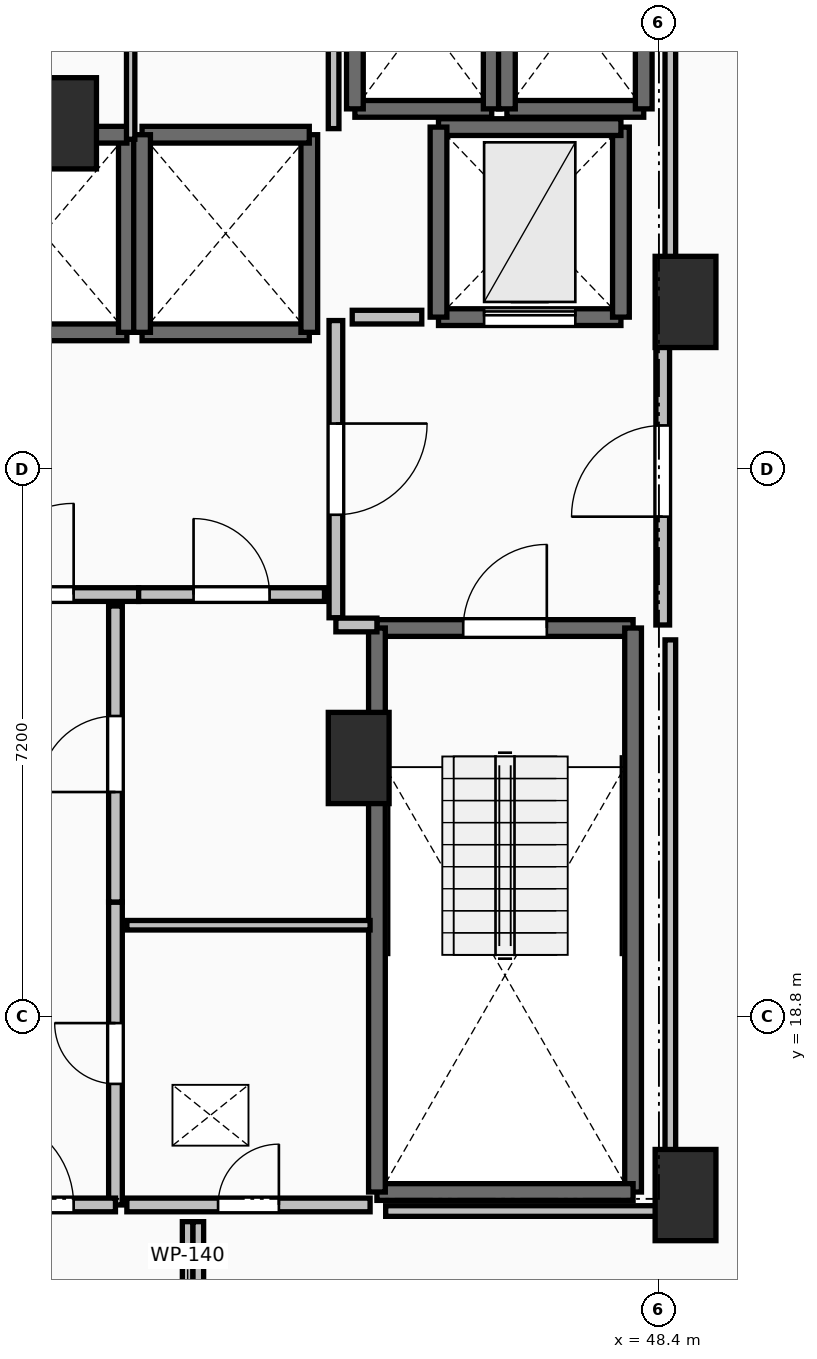
"""IFC4 building model, lengths in metres.
Left out: names, types, materials, properties, quantities, classifications, styles, units other than length and angle.
Written with IfcOpenShell. Run it as: python <this file> out.ifc"""

import sys

from ifc_helpers import new_model, si_unit, direction, frame, frame_2d, origin, origin_2d, place, context, subcontext, project, spatial, rectangle, extrude, element, fill, save


model = new_model("IFC4")
c1 = context("Model", 3, precision=1e-05, world=origin(), true_north=direction((0.0, 1.0)))
c2 = subcontext(c1, "Body", "Model", "MODEL_VIEW")
j1 = project(units=[si_unit("LENGTHUNIT", "METRE"), si_unit("PLANEANGLEUNIT", "RADIAN")], contexts=[c1])
p1 = place(None, origin())
s1 = spatial("IfcSite", under=j1, at=p1, CompositionType="ELEMENT")
p2 = place(p1, origin())
s2 = spatial("IfcBuilding", under=s1, at=p2, CompositionType="ELEMENT")
p3 = place(p2, frame((0.0, 0.0, 160.6)))
s3 = spatial("IfcBuildingStorey", under=s2, at=p3, CompositionType="ELEMENT", Elevation=160.6)
for number, where, z_axis, x_axis in (
    (1, (48.75, 28.2, 0.0), (0.0, 0.0, 1.0), (1.0, 0.0, 0.0)),
    (2, (48.75, 16.45, 0.0), (0.0, 0.0, 1.0), (1.0, 0.0, 0.0)),
    (3, (44.45, 22.2, 0.0), (0.0, 0.0, 1.0), (1.0, 0.0, 0.0)),
    (4, (40.6, 30.55, 0.0), (0.0, 0.0, 1.0), (1.0, 0.0, 0.0)),
):
    element("IfcColumn", number, at=place(p3, frame(where, z_axis=z_axis, x_axis=x_axis)), inside=s3, PredefinedType="PILASTER", context=c2, shape_type="SweptSolid", body=[
        extrude(rectangle(XDim=0.8, YDim=1.2, at=origin_2d()), origin(), (0.0, 0.0, 1.0), 3.5),
    ])
p4 = place(p3, frame((44.69, 23.91, 0.0), z_axis=(0.0, 0.0, 1.0), x_axis=(1.0, 0.0, 0.0)))
e5 = element("IfcWall", 5, at=p4, inside=s3, PredefinedType="SOLIDWALL", context=c2, shape_type="SweptSolid", body=[
    extrude(rectangle(XDim=3.37, YDim=0.22, at=frame_2d((1.685, 0.0))), origin(), (0.0, 0.0, 1.0), 3.24),
])
p5 = place(p4, frame((1.135, 0.0, 0.0)))
e6 = element("IfcOpeningElement", 6, at=p5, cuts=e5, PredefinedType="OPENING", context=c2, shape_type="SweptSolid", body=[
    extrude(rectangle(XDim=1.1, YDim=2.15, at=frame_2d((0.55, 1.075))), frame((0.0, 0.125, 0.0), z_axis=(0.0, -1.0, 0.0), x_axis=(1.0, 0.0, 0.0)), (0.0, 0.0, 1.0), 0.25),
])
p6 = place(p3, frame((48.06, 23.91, 0.0), z_axis=(0.0, 0.0, 1.0), x_axis=(0.0, -1.0, 0.0)))
e7 = element("IfcWall", 7, at=p6, inside=s3, PredefinedType="SOLIDWALL", context=c2, shape_type="SweptSolid", body=[
    extrude(rectangle(XDim=7.42, YDim=0.22, at=frame_2d((3.71, 0.0))), origin(), (0.0, 0.0, 1.0), 3.24),
])
p7 = place(p3, frame((48.06, 16.49, 0.0), z_axis=(0.0, 0.0, 1.0), x_axis=(-1.0, 0.0, 0.0)))
e8 = element("IfcWall", 8, at=p7, inside=s3, PredefinedType="SOLIDWALL", context=c2, shape_type="SweptSolid", body=[
    extrude(rectangle(XDim=3.37, YDim=0.22, at=frame_2d((1.685, 0.0))), origin(), (0.0, 0.0, 1.0), 3.24),
])
p8 = place(p3, frame((44.69, 16.49, 0.0), z_axis=(0.0, 0.0, 1.0), x_axis=(0.0, 1.0, 0.0)))
e9 = element("IfcWall", 9, at=p8, inside=s3, PredefinedType="SOLIDWALL", context=c2, shape_type="SweptSolid", body=[
    extrude(rectangle(XDim=7.42, YDim=0.22, at=frame_2d((3.71, 0.0))), origin(), (0.0, 0.0, 1.0), 3.24),
])
p9 = place(p3, frame((39.2, 27.8, 0.0), z_axis=(0.0, 0.0, 1.0), x_axis=(1.0, 0.0, 0.0)))
e10 = element("IfcWall", 10, at=p9, inside=s3, PredefinedType="SOLIDWALL", context=c2, shape_type="SweptSolid", body=[
    extrude(rectangle(XDim=2.2, YDim=0.22, at=frame_2d((1.1, 0.0))), origin(), (0.0, 0.0, 1.0), 3.24),
])
p10 = place(p3, frame((41.4, 27.8, 0.0), z_axis=(0.0, 0.0, 1.0), x_axis=(0.0, 1.0, 0.0)))
e11 = element("IfcWall", 11, at=p10, inside=s3, PredefinedType="SOLIDWALL", context=c2, shape_type="SweptSolid", body=[
    extrude(rectangle(XDim=2.6, YDim=0.22, at=frame_2d((1.3, 0.0))), origin(), (0.0, 0.0, 1.0), 3.24),
])
for number, where, z_axis, x_axis in (
    (12, (41.4, 30.4, 0.0), (0.0, 0.0, 1.0), (-1.0, 0.0, 0.0)),
    (13, (41.6, 27.8, 0.0), (0.0, 0.0, 1.0), (1.0, 0.0, 0.0)),
):
    element("IfcWall", number, at=place(p3, frame(where, z_axis=z_axis, x_axis=x_axis)), inside=s3, PredefinedType="SOLIDWALL", context=c2, shape_type="SweptSolid", body=[
        extrude(rectangle(XDim=2.2, YDim=0.22, at=frame_2d((1.1, 0.0))), origin(), (0.0, 0.0, 1.0), 3.24),
    ])
p11 = place(p3, frame((43.8, 27.8, 0.0), z_axis=(0.0, 0.0, 1.0), x_axis=(0.0, 1.0, 0.0)))
e14 = element("IfcWall", 14, at=p11, inside=s3, PredefinedType="SOLIDWALL", context=c2, shape_type="SweptSolid", body=[
    extrude(rectangle(XDim=2.6, YDim=0.22, at=frame_2d((1.3, 0.0))), origin(), (0.0, 0.0, 1.0), 3.24),
])
p12 = place(p3, frame((43.8, 30.4, 0.0), z_axis=(0.0, 0.0, 1.0), x_axis=(-1.0, 0.0, 0.0)))
e15 = element("IfcWall", 15, at=p12, inside=s3, PredefinedType="SOLIDWALL", context=c2, shape_type="SweptSolid", body=[
    extrude(rectangle(XDim=2.2, YDim=0.22, at=frame_2d((1.1, 0.0))), origin(), (0.0, 0.0, 1.0), 3.24),
])
p13 = place(p3, frame((41.6, 30.4, 0.0), z_axis=(0.0, 0.0, 1.0), x_axis=(0.0, -1.0, 0.0)))
e16 = element("IfcWall", 16, at=p13, inside=s3, PredefinedType="SOLIDWALL", context=c2, shape_type="SweptSolid", body=[
    extrude(rectangle(XDim=2.6, YDim=0.22, at=frame_2d((1.3, 0.0))), origin(), (0.0, 0.0, 1.0), 3.24),
])
p14 = place(p3, frame((44.4, 30.74, 0.0), z_axis=(0.0, 0.0, 1.0), x_axis=(1.0, 0.0, 0.0)))
e17 = element("IfcWall", 17, at=p14, inside=s3, PredefinedType="SOLIDWALL", context=c2, shape_type="SweptSolid", body=[
    extrude(rectangle(XDim=1.8, YDim=0.22, at=frame_2d((0.9, 0.0))), origin(), (0.0, 0.0, 1.0), 3.24),
])
for number, where, z_axis, x_axis in (
    (18, (46.2, 30.74, 0.0), (0.0, 0.0, 1.0), (0.0, 1.0, 0.0)),
    (19, (44.4, 33.16, 0.0), (0.0, 0.0, 1.0), (0.0, -1.0, 0.0)),
):
    element("IfcWall", number, at=place(p3, frame(where, z_axis=z_axis, x_axis=x_axis)), inside=s3, PredefinedType="SOLIDWALL", context=c2, shape_type="SweptSolid", body=[
        extrude(rectangle(XDim=2.42, YDim=0.22, at=frame_2d((1.21, 0.0))), origin(), (0.0, 0.0, 1.0), 3.24),
    ])
p15 = place(p3, frame((46.4, 30.74, 0.0), z_axis=(0.0, 0.0, 1.0), x_axis=(1.0, 0.0, 0.0)))
e20 = element("IfcWall", 20, at=p15, inside=s3, PredefinedType="SOLIDWALL", context=c2, shape_type="SweptSolid", body=[
    extrude(rectangle(XDim=1.8, YDim=0.22, at=frame_2d((0.9, 0.0))), origin(), (0.0, 0.0, 1.0), 3.24),
])
for number, where, z_axis, x_axis in (
    (21, (48.2, 30.74, 0.0), (0.0, 0.0, 1.0), (0.0, 1.0, 0.0)),
    (22, (46.4, 33.16, 0.0), (0.0, 0.0, 1.0), (0.0, -1.0, 0.0)),
):
    element("IfcWall", number, at=place(p3, frame(where, z_axis=z_axis, x_axis=x_axis)), inside=s3, PredefinedType="SOLIDWALL", context=c2, shape_type="SweptSolid", body=[
        extrude(rectangle(XDim=2.42, YDim=0.22, at=frame_2d((1.21, 0.0))), origin(), (0.0, 0.0, 1.0), 3.24),
    ])
p16 = place(p3, frame((45.5, 28.0, 0.0), z_axis=(0.0, 0.0, 1.0), x_axis=(1.0, 0.0, 0.0)))
e23 = element("IfcWall", 23, at=p16, inside=s3, PredefinedType="SHEAR", context=c2, shape_type="SweptSolid", body=[
    extrude(rectangle(XDim=2.4, YDim=0.22, at=frame_2d((1.2, 0.0))), origin(), (0.0, 0.0, 1.0), 3.24),
])
p17 = place(p16, frame((0.6, 0.0, 0.0)))
e24 = element("IfcOpeningElement", 24, at=p17, cuts=e23, PredefinedType="OPENING", context=c2, shape_type="SweptSolid", body=[
    extrude(rectangle(XDim=1.2, YDim=2.2, at=frame_2d((0.6, 1.1))), frame((0.0, 0.125, 0.0), z_axis=(0.0, -1.0, 0.0), x_axis=(1.0, 0.0, 0.0)), (0.0, 0.0, 1.0), 0.25),
])
p18 = place(p3, frame((47.9, 28.0, 0.0), z_axis=(0.0, 0.0, 1.0), x_axis=(0.0, 1.0, 0.0)))
e25 = element("IfcWall", 25, at=p18, inside=s3, PredefinedType="SHEAR", context=c2, shape_type="SweptSolid", body=[
    extrude(rectangle(XDim=2.5, YDim=0.22, at=frame_2d((1.25, 0.0))), origin(), (0.0, 0.0, 1.0), 3.24),
])
p19 = place(p3, frame((47.9, 30.5, 0.0), z_axis=(0.0, 0.0, 1.0), x_axis=(-1.0, 0.0, 0.0)))
e26 = element("IfcWall", 26, at=p19, inside=s3, PredefinedType="SHEAR", context=c2, shape_type="SweptSolid", body=[
    extrude(rectangle(XDim=2.4, YDim=0.22, at=frame_2d((1.2, 0.0))), origin(), (0.0, 0.0, 1.0), 3.24),
])
p20 = place(p3, frame((45.5, 30.5, 0.0), z_axis=(0.0, 0.0, 1.0), x_axis=(0.0, -1.0, 0.0)))
e27 = element("IfcWall", 27, at=p20, inside=s3, PredefinedType="SHEAR", context=c2, shape_type="SweptSolid", body=[
    extrude(rectangle(XDim=2.5, YDim=0.22, at=frame_2d((1.25, 0.0))), origin(), (0.0, 0.0, 1.0), 3.24),
])
p21 = place(p3, frame((44.15, 27.955, 0.0), z_axis=(0.0, 0.0, 1.0), x_axis=(0.0, -1.0, 0.0)))
e28 = element("IfcWall", 28, at=p21, inside=s3, PredefinedType="PARTITIONING", context=c2, shape_type="SweptSolid", body=[
    extrude(rectangle(XDim=3.91, YDim=0.18, at=frame_2d((1.955, 0.0))), origin(), (0.0, 0.0, 1.0), 3.24),
])
p22 = place(p21, frame((1.355, 0.0, 0.0)))
e29 = element("IfcOpeningElement", 29, at=p22, cuts=e28, PredefinedType="OPENING", context=c2, shape_type="SweptSolid", body=[
    extrude(rectangle(XDim=1.2, YDim=2.15, at=frame_2d((0.6, 1.075))), frame((0.0, 0.105, 0.0), z_axis=(0.0, -1.0, 0.0), x_axis=(1.0, 0.0, 0.0)), (0.0, 0.0, 1.0), 0.21),
])
p23 = place(p3, frame((44.15, 23.95, 0.0), z_axis=(0.0, 0.0, 1.0), x_axis=(1.0, 0.0, 0.0)))
e30 = element("IfcWall", 30, at=p23, inside=s3, PredefinedType="PARTITIONING", context=c2, shape_type="SweptSolid", body=[
    extrude(rectangle(XDim=0.54, YDim=0.18, at=frame_2d((0.27, 0.0))), origin(), (0.0, 0.0, 1.0), 3.24),
])
p24 = place(p3, frame((48.45, 23.95, 0.0), z_axis=(0.0, 0.0, 1.0), x_axis=(0.0, 1.0, 0.0)))
e31 = element("IfcWall", 31, at=p24, inside=s3, PredefinedType="PARTITIONING", context=c2, shape_type="SweptSolid", body=[
    extrude(rectangle(XDim=4.05, YDim=0.18, at=frame_2d((2.025, 0.0))), origin(), (0.0, 0.0, 1.0), 3.24),
])
p25 = place(p24, frame((1.425, 0.0, 0.0)))
e32 = element("IfcOpeningElement", 32, at=p25, cuts=e31, PredefinedType="OPENING", context=c2, shape_type="SweptSolid", body=[
    extrude(rectangle(XDim=1.2, YDim=2.15, at=frame_2d((0.6, 1.075))), frame((0.0, 0.105, 0.0), z_axis=(0.0, -1.0, 0.0), x_axis=(1.0, 0.0, 0.0)), (0.0, 0.0, 1.0), 0.21),
])
p26 = place(p3, frame((38.645, 24.35, 0.0), z_axis=(0.0, 0.0, 1.0), x_axis=(1.0, 0.0, 0.0)))
e33 = element("IfcWall", 33, at=p26, inside=s3, PredefinedType="PARTITIONING", context=c2, shape_type="SweptSolid", body=[
    extrude(rectangle(XDim=2.91, YDim=0.18, at=frame_2d((1.455, 0.0))), origin(), (0.0, 0.0, 1.0), 3.24),
])
p27 = place(p26, frame((0.855, 0.0, 0.0)))
e34 = element("IfcOpeningElement", 34, at=p27, cuts=e33, PredefinedType="OPENING", context=c2, shape_type="SweptSolid", body=[
    extrude(rectangle(XDim=1.2, YDim=2.15, at=frame_2d((0.6, 1.075))), frame((0.0, 0.105, 0.0), z_axis=(0.0, -1.0, 0.0), x_axis=(1.0, 0.0, 0.0)), (0.0, 0.0, 1.0), 0.21),
])
p28 = place(p3, frame((41.555, 24.35, 0.0), z_axis=(0.0, 0.0, 1.0), x_axis=(1.0, 0.0, 0.0)))
e35 = element("IfcWall", 35, at=p28, inside=s3, PredefinedType="PARTITIONING", context=c2, shape_type="SweptSolid", body=[
    extrude(rectangle(XDim=2.445, YDim=0.18, at=frame_2d((1.223, 0.0))), origin(), (0.0, 0.0, 1.0), 3.24),
])
p29 = place(p28, frame((0.722, 0.0, 0.0)))
e36 = element("IfcOpeningElement", 36, at=p29, cuts=e35, PredefinedType="OPENING", context=c2, shape_type="SweptSolid", body=[
    extrude(rectangle(XDim=1.0, YDim=2.15, at=frame_2d((0.5, 1.075))), frame((0.0, 0.105, 0.0), z_axis=(0.0, -1.0, 0.0), x_axis=(1.0, 0.0, 0.0)), (0.0, 0.0, 1.0), 0.21),
])
p30 = place(p3, frame((41.25, 16.32, 0.0), z_axis=(0.0, 0.0, 1.0), x_axis=(0.0, 1.0, 0.0)))
e37 = element("IfcWall", 37, at=p30, inside=s3, PredefinedType="PARTITIONING", context=c2, shape_type="SweptSolid", body=[
    extrude(rectangle(XDim=3.985, YDim=0.18, at=frame_2d((1.992, 0.0))), origin(), (0.0, 0.0, 1.0), 3.24),
])
p31 = place(p30, frame((1.593, 0.0, 0.0)))
e38 = element("IfcOpeningElement", 38, at=p31, cuts=e37, PredefinedType="OPENING", context=c2, shape_type="SweptSolid", body=[
    extrude(rectangle(XDim=0.8, YDim=2.05, at=frame_2d((0.4, 1.025))), frame((0.0, 0.105, 0.0), z_axis=(0.0, -1.0, 0.0), x_axis=(1.0, 0.0, 0.0)), (0.0, 0.0, 1.0), 0.21),
])
p32 = place(p3, frame((41.25, 20.305, 0.0), z_axis=(0.0, 0.0, 1.0), x_axis=(0.0, 1.0, 0.0)))
e39 = element("IfcWall", 39, at=p32, inside=s3, PredefinedType="PARTITIONING", context=c2, shape_type="SweptSolid", body=[
    extrude(rectangle(XDim=3.895, YDim=0.18, at=frame_2d((1.948, 0.0))), origin(), (0.0, 0.0, 1.0), 3.24),
])
p33 = place(p32, frame((1.448, 0.0, 0.0)))
e40 = element("IfcOpeningElement", 40, at=p33, cuts=e39, PredefinedType="OPENING", context=c2, shape_type="SweptSolid", body=[
    extrude(rectangle(XDim=1.0, YDim=2.15, at=frame_2d((0.5, 1.075))), frame((0.0, 0.105, 0.0), z_axis=(0.0, -1.0, 0.0), x_axis=(1.0, 0.0, 0.0)), (0.0, 0.0, 1.0), 0.21),
])
p34 = place(p3, frame((38.95, 16.32, 0.0), z_axis=(0.0, 0.0, 1.0), x_axis=(1.0, 0.0, 0.0)))
e41 = element("IfcWall", 41, at=p34, inside=s3, PredefinedType="PARTITIONING", context=c2, shape_type="SweptSolid", body=[
    extrude(rectangle(XDim=2.3, YDim=0.18, at=frame_2d((1.15, 0.0))), origin(), (0.0, 0.0, 1.0), 3.24),
])
p35 = place(p34, frame((0.55, 0.0, 0.0)))
e42 = element("IfcOpeningElement", 42, at=p35, cuts=e41, PredefinedType="OPENING", context=c2, shape_type="SweptSolid", body=[
    extrude(rectangle(XDim=1.2, YDim=2.15, at=frame_2d((0.6, 1.075))), frame((0.0, 0.105, 0.0), z_axis=(0.0, -1.0, 0.0), x_axis=(1.0, 0.0, 0.0)), (0.0, 0.0, 1.0), 0.21),
])
p36 = place(p3, frame((44.6, 20.0, 0.0), z_axis=(0.0, 0.0, 1.0), x_axis=(-1.0, 0.0, 0.0)))
e43 = element("IfcWall", 43, at=p36, inside=s3, PredefinedType="PARTITIONING", context=c2, shape_type="SweptSolid", body=[
    extrude(rectangle(XDim=3.2, YDim=0.125, at=frame_2d((1.6, 0.0))), origin(), (0.0, 0.0, 1.0), 3.24),
])
p37 = place(p3, frame((41.4, 16.32, 0.0), z_axis=(0.0, 0.0, 1.0), x_axis=(1.0, 0.0, 0.0)))
e44 = element("IfcWall", 44, at=p37, inside=s3, PredefinedType="PARTITIONING", context=c2, shape_type="SweptSolid", body=[
    extrude(rectangle(XDim=3.2, YDim=0.18, at=frame_2d((1.6, 0.0))), origin(), (0.0, 0.0, 1.0), 3.24),
])
p38 = place(p37, frame((1.2, 0.0, 0.0)))
e45 = element("IfcOpeningElement", 45, at=p38, cuts=e44, PredefinedType="OPENING", context=c2, shape_type="SweptSolid", body=[
    extrude(rectangle(XDim=0.8, YDim=2.05, at=frame_2d((0.4, 1.025))), frame((0.0, 0.105, 0.0), z_axis=(0.0, -1.0, 0.0), x_axis=(1.0, 0.0, 0.0)), (0.0, 0.0, 1.0), 0.21),
])
p39 = place(p3, frame((41.45, 30.34, 0.0), z_axis=(0.0, 0.0, 1.0), x_axis=(0.0, 1.0, 0.0)))
e46 = element("IfcWall", 46, at=p39, inside=s3, PredefinedType="PARTITIONING", context=c2, shape_type="SweptSolid", body=[
    extrude(rectangle(XDim=3.56, YDim=0.11, at=frame_2d((1.78, 0.0))), origin(), (0.0, 0.0, 1.0), 3.24),
])
p40 = place(p3, frame((45.28, 28.0, 0.0), z_axis=(0.0, 0.0, 1.0), x_axis=(-1.0, 0.0, 0.0)))
e47 = element("IfcWall", 47, at=p40, inside=s3, PredefinedType="PARTITIONING", context=c2, shape_type="SweptSolid", body=[
    extrude(rectangle(XDim=0.915, YDim=0.18, at=frame_2d((0.458, 0.0))), origin(), (0.0, 0.0, 1.0), 3.24),
])
p41 = place(p3, frame((44.12, 30.48, 0.0), z_axis=(0.0, 0.0, 1.0), x_axis=(0.0, 1.0, 0.0)))
e48 = element("IfcWall", 48, at=p41, inside=s3, PredefinedType="PARTITIONING", context=c2, shape_type="SweptSolid", body=[
    extrude(rectangle(XDim=2.41, YDim=0.14, at=frame_2d((1.205, 0.0))), origin(), (0.0, 0.0, 1.0), 3.24),
])
p42 = place(p3, frame((48.55, 28.196, 0.0), z_axis=(0.0, 0.0, 1.0), x_axis=(0.0, 1.0, 0.0)))
e49 = element("IfcWall", 49, at=p42, inside=s3, PredefinedType="PARTITIONING", context=c2, shape_type="SweptSolid", body=[
    extrude(rectangle(XDim=5.254, YDim=0.14, at=frame_2d((2.627, 0.0))), origin(), (0.0, 0.0, 1.0), 2.432),
])
for number, where, z_axis, x_axis in (
    (50, (42.2, 16.1, 0.0), (0.0, 0.0, 1.0), (0.0, -1.0, 0.0)),
    (51, (42.34, 14.27, 0.0), (0.0, 0.0, 1.0), (0.0, 1.0, 0.0)),
):
    element("IfcWall", number, at=place(p3, frame(where, z_axis=z_axis, x_axis=x_axis)), inside=s3, PredefinedType="PARTITIONING", context=c2, shape_type="SweptSolid", body=[
        extrude(rectangle(XDim=1.83, YDim=0.14, at=frame_2d((0.915, 0.0))), origin(), (0.0, 0.0, 1.0), 3.24),
    ])
p43 = place(p3, frame((44.805, 16.24, 0.0), z_axis=(0.0, 0.0, 1.0), x_axis=(1.0, 0.0, 0.0)))
e52 = element("IfcWall", 52, at=p43, inside=s3, PredefinedType="PARTITIONING", context=c2, shape_type="SweptSolid", body=[
    extrude(rectangle(XDim=3.745, YDim=0.14, at=frame_2d((1.873, 0.0))), origin(), (0.0, 0.0, 1.0), 2.432),
])
p44 = place(p3, frame((48.55, 16.24, 0.0), z_axis=(0.0, 0.0, 1.0), x_axis=(0.0, 1.0, 0.0)))
e53 = element("IfcWall", 53, at=p44, inside=s3, PredefinedType="PARTITIONING", context=c2, shape_type="SweptSolid", body=[
    extrude(rectangle(XDim=7.514, YDim=0.14, at=frame_2d((3.757, 0.0))), origin(), (0.0, 0.0, 1.0), 2.432),
])
p45 = place(p5, origin())
e54 = element("IfcDoor", 54, at=p45, inside=s3, OperationType="SINGLE_SWING_RIGHT", PredefinedType="DOOR", context=c2, shape_type="SweptSolid", body=[
    extrude(rectangle(XDim=1.1, YDim=2.15, at=frame_2d((0.55, 1.075))), frame((0.0, 0.025, 0.0), z_axis=(0.0, -1.0, 0.0), x_axis=(1.0, 0.0, 0.0)), (0.0, 0.0, 1.0), 0.05),
])
fill(e6, e54)
p46 = place(p17, origin())
e55 = element("IfcDoor", 55, at=p46, inside=s3, OperationType="SLIDING_TO_LEFT", PredefinedType="DOOR", context=c2, shape_type="SweptSolid", body=[
    extrude(rectangle(XDim=1.2, YDim=2.2, at=frame_2d((0.6, 1.1))), frame((0.0, 0.025, 0.0), z_axis=(0.0, -1.0, 0.0), x_axis=(1.0, 0.0, 0.0)), (0.0, 0.0, 1.0), 0.05),
])
fill(e24, e55)
p47 = place(p22, origin())
e56 = element("IfcDoor", 56, at=p47, inside=s3, OperationType="SINGLE_SWING_LEFT", PredefinedType="DOOR", context=c2, shape_type="SweptSolid", body=[
    extrude(rectangle(XDim=1.2, YDim=2.15, at=frame_2d((0.6, 1.075))), frame((0.0, 0.025, 0.0), z_axis=(0.0, -1.0, 0.0), x_axis=(1.0, 0.0, 0.0)), (0.0, 0.0, 1.0), 0.05),
])
fill(e29, e56)
p48 = place(p25, origin())
e57 = element("IfcDoor", 57, at=p48, inside=s3, OperationType="SINGLE_SWING_LEFT", PredefinedType="DOOR", context=c2, shape_type="SweptSolid", body=[
    extrude(rectangle(XDim=1.2, YDim=2.15, at=frame_2d((0.6, 1.075))), frame((0.0, 0.025, 0.0), z_axis=(0.0, -1.0, 0.0), x_axis=(1.0, 0.0, 0.0)), (0.0, 0.0, 1.0), 0.05),
])
fill(e32, e57)
p49 = place(p27, origin())
e58 = element("IfcDoor", 58, at=p49, inside=s3, OperationType="SINGLE_SWING_RIGHT", PredefinedType="DOOR", context=c2, shape_type="SweptSolid", body=[
    extrude(rectangle(XDim=1.2, YDim=2.15, at=frame_2d((0.6, 1.075))), frame((0.0, 0.025, 0.0), z_axis=(0.0, -1.0, 0.0), x_axis=(1.0, 0.0, 0.0)), (0.0, 0.0, 1.0), 0.05),
])
fill(e34, e58)
p50 = place(p29, origin())
e59 = element("IfcDoor", 59, at=p50, inside=s3, OperationType="SINGLE_SWING_LEFT", PredefinedType="DOOR", context=c2, shape_type="SweptSolid", body=[
    extrude(rectangle(XDim=1.0, YDim=2.15, at=frame_2d((0.5, 1.075))), frame((0.0, 0.025, 0.0), z_axis=(0.0, -1.0, 0.0), x_axis=(1.0, 0.0, 0.0)), (0.0, 0.0, 1.0), 0.05),
])
fill(e36, e59)
p51 = place(p31, origin())
e60 = element("IfcDoor", 60, at=p51, inside=s3, OperationType="SINGLE_SWING_RIGHT", PredefinedType="DOOR", context=c2, shape_type="SweptSolid", body=[
    extrude(rectangle(XDim=0.8, YDim=2.05, at=frame_2d((0.4, 1.025))), frame((0.0, 0.025, 0.0), z_axis=(0.0, -1.0, 0.0), x_axis=(1.0, 0.0, 0.0)), (0.0, 0.0, 1.0), 0.05),
])
fill(e38, e60)
p52 = place(p33, origin())
e61 = element("IfcDoor", 61, at=p52, inside=s3, OperationType="SINGLE_SWING_LEFT", PredefinedType="DOOR", context=c2, shape_type="SweptSolid", body=[
    extrude(rectangle(XDim=1.0, YDim=2.15, at=frame_2d((0.5, 1.075))), frame((0.0, 0.025, 0.0), z_axis=(0.0, -1.0, 0.0), x_axis=(1.0, 0.0, 0.0)), (0.0, 0.0, 1.0), 0.05),
])
fill(e40, e61)
p53 = place(p35, origin())
e62 = element("IfcDoor", 62, at=p53, inside=s3, OperationType="SINGLE_SWING_LEFT", PredefinedType="DOOR", context=c2, shape_type="SweptSolid", body=[
    extrude(rectangle(XDim=1.2, YDim=2.15, at=frame_2d((0.6, 1.075))), frame((0.0, 0.025, 0.0), z_axis=(0.0, -1.0, 0.0), x_axis=(1.0, 0.0, 0.0)), (0.0, 0.0, 1.0), 0.05),
])
fill(e42, e62)
p54 = place(p38, origin())
e63 = element("IfcDoor", 63, at=p54, inside=s3, OperationType="SINGLE_SWING_RIGHT", PredefinedType="DOOR", context=c2, shape_type="SweptSolid", body=[
    extrude(rectangle(XDim=0.8, YDim=2.05, at=frame_2d((0.4, 1.025))), frame((0.0, 0.025, 0.0), z_axis=(0.0, -1.0, 0.0), x_axis=(1.0, 0.0, 0.0)), (0.0, 0.0, 1.0), 0.05),
])
fill(e45, e63)
save(model, sys.argv[1])
